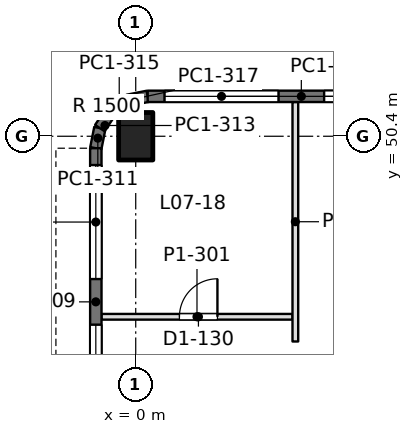
"""IFC4 building model, lengths in metres.
Left out: names, types, materials, properties, quantities, classifications, styles, units other than length and angle.
Written with IfcOpenShell. Run it as: python <this file> out.ifc"""

import sys

from ifc_helpers import new_model, si_unit, direction, frame, frame_2d, origin, origin_2d, place, context, subcontext, project, spatial, rectangle, extrude, element, fill, save


model = new_model("IFC4")
c1 = context("Model", 3, precision=1e-05, world=origin(), true_north=direction((0.0, 1.0)))
c2 = subcontext(c1, "Body", "Model", "MODEL_VIEW")
j1 = project(units=[si_unit("LENGTHUNIT", "METRE"), si_unit("PLANEANGLEUNIT", "RADIAN")], contexts=[c1])
p1 = place(None, origin())
s1 = spatial("IfcSite", under=j1, at=p1, CompositionType="ELEMENT")
p2 = place(p1, origin())
s2 = spatial("IfcBuilding", under=s1, at=p2, CompositionType="ELEMENT")
p3 = place(p2, frame((0.0, 0.0, 32.4)))
s3 = spatial("IfcBuildingStorey", under=s2, at=p3, CompositionType="ELEMENT", Elevation=32.4)
p4 = place(p3, frame((0.0, 50.4, 0.0), z_axis=(0.0, 0.0, 1.0), x_axis=(1.0, 0.0, 0.0)))
e1 = element("IfcColumn", 1, at=p4, inside=s3, PredefinedType="COLUMN", context=c2, shape_type="SweptSolid", body=[
    extrude(rectangle(XDim=0.9, YDim=1.25, at=origin_2d()), origin(), (0.0, 0.0, 1.0), 4.5),
])
p5 = place(p3, frame((-1.05, 42.0, 0.0), z_axis=(0.0, 0.0, 1.0), x_axis=(0.0, 1.0, 0.0)))
e2 = element("IfcWall", 2, at=p5, inside=s3, PredefinedType="SOLIDWALL", context=c2, shape_type="SweptSolid", body=[
    extrude(rectangle(XDim=8.085, YDim=0.3, at=frame_2d((4.042, 0.0))), origin(), (0.0, 0.0, 1.0), 4.34),
])
p6 = place(p5, frame((0.443, 0.0, 0.9)))
e3 = element("IfcOpeningElement", 3, at=p6, cuts=e2, PredefinedType="OPENING", context=c2, shape_type="SweptSolid", body=[
    extrude(rectangle(XDim=3.0, YDim=1.9, at=frame_2d((1.5, 0.95))), frame((0.0, 0.16, 0.0), z_axis=(0.0, -1.0, 0.0), x_axis=(1.0, 0.0, 0.0)), (0.0, 0.0, 1.0), 0.32),
])
p7 = place(p5, frame((4.643, 0.0, 0.9)))
e4 = element("IfcOpeningElement", 4, at=p7, cuts=e2, PredefinedType="OPENING", context=c2, shape_type="SweptSolid", body=[
    extrude(rectangle(XDim=3.0, YDim=1.9, at=frame_2d((1.5, 0.95))), frame((0.0, 0.16, 0.0), z_axis=(0.0, -1.0, 0.0), x_axis=(1.0, 0.0, 0.0)), (0.0, 0.0, 1.0), 0.32),
])
p8 = place(p3, frame((-1.05, 50.085, 0.0), z_axis=(0.0, 0.0, 1.0), x_axis=(0.195073962632, 0.980788534345, 0.0)))
e5 = element("IfcWall", 5, at=p8, inside=s3, PredefinedType="SOLIDWALL", context=c2, shape_type="SweptSolid", body=[
    extrude(rectangle(XDim=0.541, YDim=0.3, at=frame_2d((0.271, 0.0))), origin(), (0.0, 0.0, 1.0), 4.34),
])
for number, where, z_axis, x_axis in (
    (6, (-0.945, 50.615, 0.0), (0.0, 0.0, 1.0), (0.556, 0.831, 0.0)),
    (7, (-0.653, 51.052, 0.0), (0.0, 0.0, 1.0), (0.831, 0.556, 0.0)),
):
    element("IfcWall", number, at=place(p3, frame(where, z_axis=z_axis, x_axis=x_axis)), inside=s3, PredefinedType="SOLIDWALL", context=c2, shape_type="SweptSolid", body=[
        extrude(rectangle(XDim=0.526, YDim=0.3, at=frame_2d((0.263, 0.0))), origin(), (0.0, 0.0, 1.0), 4.34),
    ])
p9 = place(p3, frame((-0.216, 51.344, 0.0), z_axis=(0.0, 0.0, 1.0), x_axis=(0.980788534345, 0.195073962632, 0.0)))
e8 = element("IfcWall", 8, at=p9, inside=s3, PredefinedType="SOLIDWALL", context=c2, shape_type="SweptSolid", body=[
    extrude(rectangle(XDim=0.541, YDim=0.3, at=frame_2d((0.271, 0.0))), origin(), (0.0, 0.0, 1.0), 4.34),
])
p10 = place(p3, frame((0.315, 51.45, 0.0), z_axis=(0.0, 0.0, 1.0), x_axis=(1.0, 0.0, 0.0)))
e9 = element("IfcWall", 9, at=p10, inside=s3, PredefinedType="SOLIDWALL", context=c2, shape_type="SweptSolid", body=[
    extrude(rectangle(XDim=8.085, YDim=0.3, at=frame_2d((4.042, 0.0))), origin(), (0.0, 0.0, 1.0), 4.34),
])
p11 = place(p10, frame((0.443, 0.0, 0.9)))
e10 = element("IfcOpeningElement", 10, at=p11, cuts=e9, PredefinedType="OPENING", context=c2, shape_type="SweptSolid", body=[
    extrude(rectangle(XDim=3.0, YDim=1.9, at=frame_2d((1.5, 0.95))), frame((0.0, 0.16, 0.0), z_axis=(0.0, -1.0, 0.0), x_axis=(1.0, 0.0, 0.0)), (0.0, 0.0, 1.0), 0.32),
])
p12 = place(p10, frame((4.643, 0.0, 0.9)))
e11 = element("IfcOpeningElement", 11, at=p12, cuts=e9, PredefinedType="OPENING", context=c2, shape_type="SweptSolid", body=[
    extrude(rectangle(XDim=3.0, YDim=1.9, at=frame_2d((1.5, 0.95))), frame((0.0, 0.16, 0.0), z_axis=(0.0, -1.0, 0.0), x_axis=(1.0, 0.0, 0.0)), (0.0, 0.0, 1.0), 0.32),
])
p13 = place(p3, frame((-0.902, 45.65, 0.0), z_axis=(0.0, 0.0, 1.0), x_axis=(1.0, 0.0, 0.0)))
e12 = element("IfcWall", 12, at=p13, inside=s3, PredefinedType="PARTITIONING", context=c2, shape_type="SweptSolid", body=[
    extrude(rectangle(XDim=5.028, YDim=0.15, at=frame_2d((2.514, 0.0))), origin(), (0.0, 0.0, 1.0), 3.84),
])
p14 = place(p13, frame((2.052, 0.0, 0.0)))
e13 = element("IfcOpeningElement", 13, at=p14, cuts=e12, PredefinedType="OPENING", context=c2, shape_type="SweptSolid", body=[
    extrude(rectangle(XDim=1.0, YDim=2.2, at=frame_2d((0.5, 1.1))), frame((0.0, 0.085, 0.0), z_axis=(0.0, -1.0, 0.0), x_axis=(1.0, 0.0, 0.0)), (0.0, 0.0, 1.0), 0.17),
])
p15 = place(p3, frame((4.2, 45.0, 0.0), z_axis=(0.0, 0.0, 1.0), x_axis=(0.0, 1.0, 0.0)))
e14 = element("IfcWall", 14, at=p15, inside=s3, PredefinedType="PARTITIONING", context=c2, shape_type="SweptSolid", body=[
    extrude(rectangle(XDim=6.302, YDim=0.15, at=frame_2d((3.151, 0.0))), origin(), (0.0, 0.0, 1.0), 3.84),
])
p16 = place(p6, origin())
e15 = element("IfcWindow", 15, at=p16, inside=s3, PartitioningType="SINGLE_PANEL", PredefinedType="WINDOW", context=c2, shape_type="SweptSolid", body=[
    extrude(rectangle(XDim=3.0, YDim=1.9, at=frame_2d((1.5, 0.95))), frame((0.0, 0.03, 0.0), z_axis=(0.0, -1.0, 0.0), x_axis=(1.0, 0.0, 0.0)), (0.0, 0.0, 1.0), 0.06),
])
fill(e3, e15)
p17 = place(p7, origin())
e16 = element("IfcWindow", 16, at=p17, inside=s3, PartitioningType="SINGLE_PANEL", PredefinedType="WINDOW", context=c2, shape_type="SweptSolid", body=[
    extrude(rectangle(XDim=3.0, YDim=1.9, at=frame_2d((1.5, 0.95))), frame((0.0, 0.03, 0.0), z_axis=(0.0, -1.0, 0.0), x_axis=(1.0, 0.0, 0.0)), (0.0, 0.0, 1.0), 0.06),
])
fill(e4, e16)
p18 = place(p11, origin())
e17 = element("IfcWindow", 17, at=p18, inside=s3, PartitioningType="SINGLE_PANEL", PredefinedType="WINDOW", context=c2, shape_type="SweptSolid", body=[
    extrude(rectangle(XDim=3.0, YDim=1.9, at=frame_2d((1.5, 0.95))), frame((0.0, 0.03, 0.0), z_axis=(0.0, -1.0, 0.0), x_axis=(1.0, 0.0, 0.0)), (0.0, 0.0, 1.0), 0.06),
])
fill(e10, e17)
p19 = place(p12, origin())
e18 = element("IfcWindow", 18, at=p19, inside=s3, PartitioningType="SINGLE_PANEL", PredefinedType="WINDOW", context=c2, shape_type="SweptSolid", body=[
    extrude(rectangle(XDim=3.0, YDim=1.9, at=frame_2d((1.5, 0.95))), frame((0.0, 0.03, 0.0), z_axis=(0.0, -1.0, 0.0), x_axis=(1.0, 0.0, 0.0)), (0.0, 0.0, 1.0), 0.06),
])
fill(e11, e18)
p20 = place(p14, origin())
e19 = element("IfcDoor", 19, at=p20, inside=s3, OperationType="SINGLE_SWING_RIGHT", PredefinedType="DOOR", context=c2, shape_type="SweptSolid", body=[
    extrude(rectangle(XDim=1.0, YDim=2.2, at=frame_2d((0.5, 1.1))), frame((0.0, 0.025, 0.0), z_axis=(0.0, -1.0, 0.0), x_axis=(1.0, 0.0, 0.0)), (0.0, 0.0, 1.0), 0.05),
])
fill(e13, e19)
save(model, sys.argv[1])
